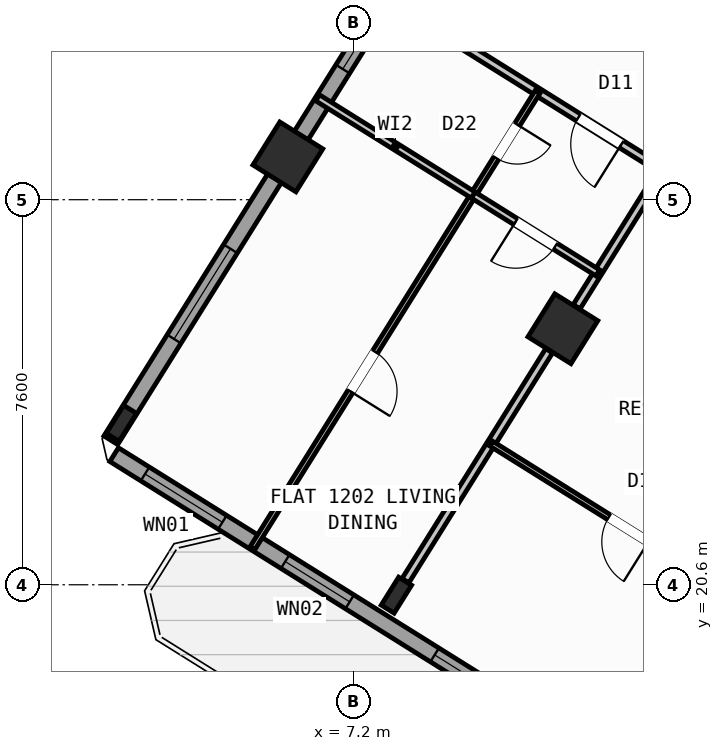
"""IFC4 building model, lengths in metres.
Left out: names, types, materials, properties, quantities, classifications, styles, units other than length and angle.
Written with IfcOpenShell. Run it as: python <this file> out.ifc"""

import sys

from ifc_helpers import new_model, si_unit, direction, frame, frame_2d, origin, origin_2d, place, context, subcontext, project, spatial, rectangle, hollow_rectangle, i_section, extrude, source, transform, mapped, element, fill, save


model = new_model("IFC4")
c1 = context("Model", 3, precision=1e-05, world=origin(), true_north=direction((0.0, 1.0)))
c2 = subcontext(c1, "Body", "Model", "MODEL_VIEW")
j1 = project(units=[si_unit("LENGTHUNIT", "METRE"), si_unit("PLANEANGLEUNIT", "RADIAN")], contexts=[c1])
p1 = place(None, origin())
s1 = spatial("IfcSite", under=j1, at=p1, CompositionType="ELEMENT")
p2 = place(p1, origin())
s2 = spatial("IfcBuilding", under=s1, at=p2, CompositionType="ELEMENT")
p3 = place(p2, frame((0.0, 0.0, 49.2)))
s3 = spatial("IfcBuildingStorey", under=s2, at=p3, CompositionType="ELEMENT", Elevation=49.2)
m1 = source(origin(), c2, "Body", "SweptSolid", [
    extrude(hollow_rectangle(XDim=1.0, YDim=1.0, WallThickness=0.04, at=origin_2d()), origin(), (0.0, 0.0, 1.0), 3.6),
])
p4 = place(p3, frame((11.336, 25.653, 0.0), z_axis=(0.0, 0.0, 1.0), x_axis=(-0.848048096156, 0.529919264233, 0.0)))
e1 = element("IfcColumn", 1, at=p4, inside=s3, PredefinedType="COLUMN", context=c2, shape_type="MappedRepresentation", body=[
    mapped(m1, transform((0.0, 0.0, 0.0), scale=1.0)),
])
m2 = source(origin(), c2, "Body", "SweptSolid", [
    extrude(i_section(OverallWidth=0.3, OverallDepth=0.65, WebThickness=0.016, FlangeThickness=0.031, at=origin_2d()), origin(), (0.0, 0.0, 1.0), 3.6),
])
p5 = place(p3, frame((8.051, 20.395, 0.0), z_axis=(0.0, 0.0, 1.0), x_axis=(-0.848048096156, 0.529919264233, 0.0)))
e2 = element("IfcColumn", 2, at=p5, inside=s3, PredefinedType="COLUMN", context=c2, shape_type="MappedRepresentation", body=[
    mapped(m2, transform((0.0, 0.0, 0.0), scale=1.0)),
])
p6 = place(p3, frame((5.909, 29.044, 0.0), z_axis=(0.0, 0.0, 1.0), x_axis=(-0.848048096156, 0.529919264233, 0.0)))
e3 = element("IfcColumn", 3, at=p6, inside=s3, PredefinedType="COLUMN", context=c2, shape_type="MappedRepresentation", body=[
    mapped(m1, transform((0.0, 0.0, 0.0), scale=1.0)),
])
p7 = place(p3, frame((2.623, 23.786, 0.0), z_axis=(0.0, 0.0, 1.0), x_axis=(-0.848048096156, 0.529919264233, 0.0)))
e4 = element("IfcColumn", 4, at=p7, inside=s3, PredefinedType="COLUMN", context=c2, shape_type="MappedRepresentation", body=[
    mapped(m2, transform((0.0, 0.0, 0.0), scale=1.0)),
])
p8 = place(p3, frame((29.268, 6.429, 0.0), z_axis=(0.0, 0.0, 1.0), x_axis=(-0.848049971435, 0.529916263149, 0.0)))
e5 = element("IfcWall", 5, at=p8, inside=s3, PredefinedType="STANDARD", context=c2, shape_type="SweptSolid", body=[
    extrude(rectangle(XDim=31.588, YDim=0.32, at=frame_2d((15.794, 0.0))), origin(), (0.0, 0.0, 1.0), 3.35),
])
p9 = place(p8, frame((16.362, 0.0, 0.0)))
e6 = element("IfcOpeningElement", 6, at=p9, cuts=e5, PredefinedType="OPENING", context=c2, shape_type="SweptSolid", body=[
    extrude(rectangle(XDim=1.2, YDim=2.15, at=frame_2d((0.6, 1.075))), frame((0.0, 0.17, 0.0), z_axis=(0.0, -1.0, 0.0), x_axis=(1.0, 0.0, 0.0)), (0.0, 0.0, 1.0), 0.34),
])
p10 = place(p8, frame((2.989, 0.0, 0.8)))
e7 = element("IfcOpeningElement", 7, at=p10, cuts=e5, PredefinedType="OPENING", context=c2, shape_type="SweptSolid", body=[
    extrude(rectangle(XDim=2.1, YDim=1.55, at=frame_2d((1.05, 0.775))), frame((0.0, 0.17, 0.0), z_axis=(0.0, -1.0, 0.0), x_axis=(1.0, 0.0, 0.0)), (0.0, 0.0, 1.0), 0.34),
])
p11 = place(p8, frame((8.359, 0.0, 0.8)))
e8 = element("IfcOpeningElement", 8, at=p11, cuts=e5, PredefinedType="OPENING", context=c2, shape_type="SweptSolid", body=[
    extrude(rectangle(XDim=2.1, YDim=1.55, at=frame_2d((1.05, 0.775))), frame((0.0, 0.17, 0.0), z_axis=(0.0, -1.0, 0.0), x_axis=(1.0, 0.0, 0.0)), (0.0, 0.0, 1.0), 0.34),
])
p12 = place(p8, frame((13.284, 0.0, 0.95)))
e9 = element("IfcOpeningElement", 9, at=p12, cuts=e5, PredefinedType="OPENING", context=c2, shape_type="SweptSolid", body=[
    extrude(rectangle(XDim=1.2, YDim=1.4, at=frame_2d((0.6, 0.7))), frame((0.0, 0.17, 0.0), z_axis=(0.0, -1.0, 0.0), x_axis=(1.0, 0.0, 0.0)), (0.0, 0.0, 1.0), 0.34),
])
p13 = place(p8, frame((20.259, 0.0, 0.95)))
e10 = element("IfcOpeningElement", 10, at=p13, cuts=e5, PredefinedType="OPENING", context=c2, shape_type="SweptSolid", body=[
    extrude(rectangle(XDim=1.2, YDim=1.4, at=frame_2d((0.6, 0.7))), frame((0.0, 0.17, 0.0), z_axis=(0.0, -1.0, 0.0), x_axis=(1.0, 0.0, 0.0)), (0.0, 0.0, 1.0), 0.34),
])
p14 = place(p8, frame((22.929, 0.0, 0.95)))
e11 = element("IfcOpeningElement", 11, at=p14, cuts=e5, PredefinedType="OPENING", context=c2, shape_type="SweptSolid", body=[
    extrude(rectangle(XDim=1.2, YDim=1.4, at=frame_2d((0.6, 0.7))), frame((0.0, 0.17, 0.0), z_axis=(0.0, -1.0, 0.0), x_axis=(1.0, 0.0, 0.0)), (0.0, 0.0, 1.0), 0.34),
])
p15 = place(p8, frame((26.106, 0.0, 0.85)))
e12 = element("IfcOpeningElement", 12, at=p15, cuts=e5, PredefinedType="OPENING", context=c2, shape_type="SweptSolid", body=[
    extrude(rectangle(XDim=1.5, YDim=1.5, at=frame_2d((0.75, 0.75))), frame((0.0, 0.17, 0.0), z_axis=(0.0, -1.0, 0.0), x_axis=(1.0, 0.0, 0.0)), (0.0, 0.0, 1.0), 0.34),
])
p16 = place(p8, frame((29.068, 0.0, 0.85)))
e13 = element("IfcOpeningElement", 13, at=p16, cuts=e5, PredefinedType="OPENING", context=c2, shape_type="SweptSolid", body=[
    extrude(rectangle(XDim=1.8, YDim=1.5, at=frame_2d((0.9, 0.75))), frame((0.0, 0.17, 0.0), z_axis=(0.0, -1.0, 0.0), x_axis=(1.0, 0.0, 0.0)), (0.0, 0.0, 1.0), 0.34),
])
p17 = place(p3, frame((2.415, 23.452, 0.0), z_axis=(0.0, 0.0, 1.0), x_axis=(0.52991049553, 0.848053575387, 0.0)))
e14 = element("IfcWall", 14, at=p17, inside=s3, PredefinedType="STANDARD", context=c2, shape_type="SweptSolid", body=[
    extrude(rectangle(XDim=21.587, YDim=0.32, at=frame_2d((10.794, 0.0))), origin(), (0.0, 0.0, 1.0), 2.725),
])
p18 = place(p17, frame((2.356, 0.0, 0.8)))
e15 = element("IfcOpeningElement", 15, at=p18, cuts=e14, PredefinedType="OPENING", context=c2, shape_type="SweptSolid", body=[
    extrude(rectangle(XDim=2.1, YDim=1.55, at=frame_2d((1.05, 0.775))), frame((0.0, 0.17, 0.0), z_axis=(0.0, -1.0, 0.0), x_axis=(1.0, 0.0, 0.0)), (0.0, 0.0, 1.0), 0.34),
])
p19 = place(p17, frame((8.639, 0.0, 1.0)))
e16 = element("IfcOpeningElement", 16, at=p19, cuts=e14, PredefinedType="OPENING", context=c2, shape_type="SweptSolid", body=[
    extrude(rectangle(XDim=0.9, YDim=1.25, at=frame_2d((0.45, 0.625))), frame((0.0, 0.17, 0.0), z_axis=(0.0, -1.0, 0.0), x_axis=(1.0, 0.0, 0.0)), (0.0, 0.0, 1.0), 0.34),
])
p20 = place(p17, frame((17.129, 0.0, 0.85)))
e17 = element("IfcOpeningElement", 17, at=p20, cuts=e14, PredefinedType="OPENING", context=c2, shape_type="SweptSolid", body=[
    extrude(rectangle(XDim=1.5, YDim=1.5, at=frame_2d((0.75, 0.75))), frame((0.0, 0.17, 0.0), z_axis=(0.0, -1.0, 0.0), x_axis=(1.0, 0.0, 0.0)), (0.0, 0.0, 1.0), 0.34),
])
p21 = place(p3, frame((23.104, 25.256, 0.0), z_axis=(0.0, 0.0, 1.0), x_axis=(-0.848041752158, 0.529929416617, 0.0)))
e18 = element("IfcWall", 18, at=p21, inside=s3, PredefinedType="PARTITIONING", context=c2, shape_type="SweptSolid", body=[
    extrude(rectangle(XDim=16.73, YDim=0.16, at=frame_2d((8.365, 0.0))), origin(), (0.0, 0.0, 1.0), 3.34),
])
p22 = place(p21, frame((1.395, 0.0, 0.0)))
e19 = element("IfcOpeningElement", 19, at=p22, cuts=e18, PredefinedType="OPENING", context=c2, shape_type="SweptSolid", body=[
    extrude(rectangle(XDim=1.0, YDim=2.1, at=frame_2d((0.5, 1.05))), frame((0.0, 0.09, 0.0), z_axis=(0.0, -1.0, 0.0), x_axis=(1.0, 0.0, 0.0)), (0.0, 0.0, 1.0), 0.18),
])
p23 = place(p21, frame((7.82, 0.0, 0.0)))
e20 = element("IfcOpeningElement", 20, at=p23, cuts=e18, PredefinedType="OPENING", context=c2, shape_type="SweptSolid", body=[
    extrude(rectangle(XDim=1.0, YDim=2.1, at=frame_2d((0.5, 1.05))), frame((0.0, 0.09, 0.0), z_axis=(0.0, -1.0, 0.0), x_axis=(1.0, 0.0, 0.0)), (0.0, 0.0, 1.0), 0.18),
])
p24 = place(p21, frame((14.76, 0.0, 0.0)))
e21 = element("IfcOpeningElement", 21, at=p24, cuts=e18, PredefinedType="OPENING", context=c2, shape_type="SweptSolid", body=[
    extrude(rectangle(XDim=1.0, YDim=2.1, at=frame_2d((0.5, 1.05))), frame((0.0, 0.09, 0.0), z_axis=(0.0, -1.0, 0.0), x_axis=(1.0, 0.0, 0.0)), (0.0, 0.0, 1.0), 0.18),
])
p25 = place(p3, frame((21.938, 23.391, 0.0), z_axis=(0.0, 0.0, 1.0), x_axis=(-0.848045850158, 0.529922858565, 0.0)))
e22 = element("IfcWall", 22, at=p25, inside=s3, PredefinedType="PARTITIONING", context=c2, shape_type="SweptSolid", body=[
    extrude(rectangle(XDim=16.73, YDim=0.16, at=frame_2d((8.365, 0.0))), origin(), (0.0, 0.0, 1.0), 3.34),
])
p26 = place(p25, frame((2.22, 0.0, 0.0)))
e23 = element("IfcOpeningElement", 23, at=p26, cuts=e22, PredefinedType="OPENING", context=c2, shape_type="SweptSolid", body=[
    extrude(rectangle(XDim=0.86, YDim=2.05, at=frame_2d((0.43, 1.025))), frame((0.0, 0.09, 0.0), z_axis=(0.0, -1.0, 0.0), x_axis=(1.0, 0.0, 0.0)), (0.0, 0.0, 1.0), 0.18),
])
p27 = place(p25, frame((6.49, 0.0, 0.0)))
e24 = element("IfcOpeningElement", 24, at=p27, cuts=e22, PredefinedType="OPENING", context=c2, shape_type="SweptSolid", body=[
    extrude(rectangle(XDim=1.0, YDim=2.1, at=frame_2d((0.5, 1.05))), frame((0.0, 0.09, 0.0), z_axis=(0.0, -1.0, 0.0), x_axis=(1.0, 0.0, 0.0)), (0.0, 0.0, 1.0), 0.18),
])
p28 = place(p25, frame((11.14, 0.0, 0.0)))
e25 = element("IfcOpeningElement", 25, at=p28, cuts=e22, PredefinedType="OPENING", context=c2, shape_type="SweptSolid", body=[
    extrude(rectangle(XDim=1.0, YDim=2.1, at=frame_2d((0.5, 1.05))), frame((0.0, 0.09, 0.0), z_axis=(0.0, -1.0, 0.0), x_axis=(1.0, 0.0, 0.0)), (0.0, 0.0, 1.0), 0.18),
])
p29 = place(p3, frame((13.297, 28.791, 0.0), z_axis=(0.0, 0.0, 1.0), x_axis=(-0.529930102756, -0.848041323399, 0.0)))
e26 = element("IfcWall", 26, at=p29, inside=s3, PredefinedType="PARTITIONING", context=c2, shape_type="SweptSolid", body=[
    extrude(rectangle(XDim=3.188, YDim=0.16, at=frame_2d((1.594, 0.0))), origin(), (0.0, 0.0, 1.0), 2.725),
])
p30 = place(p3, frame((11.065, 25.219, 0.0), z_axis=(0.0, 0.0, 1.0), x_axis=(-0.529904608059, -0.848057254175, 0.0)))
e27 = element("IfcWall", 27, at=p30, inside=s3, PredefinedType="PARTITIONING", context=c2, shape_type="SweptSolid", body=[
    extrude(rectangle(XDim=5.351, YDim=0.16, at=frame_2d((2.675, 0.0))), origin(), (0.0, 0.0, 1.0), 2.725),
])
p31 = place(p3, frame((15.348, 19.995, 0.0), z_axis=(0.0, 0.0, 1.0), x_axis=(-0.848056163074, 0.529906354247, 0.0)))
e28 = element("IfcWall", 28, at=p31, inside=s3, PredefinedType="PARTITIONING", context=c2, shape_type="SweptSolid", body=[
    extrude(rectangle(XDim=6.4, YDim=0.11, at=frame_2d((3.2, 0.0))), origin(), (0.0, 0.0, 1.0), 3.34),
])
p32 = place(p31, frame((2.74, 0.0, 0.0)))
e29 = element("IfcOpeningElement", 29, at=p32, cuts=e28, PredefinedType="OPENING", context=c2, shape_type="SweptSolid", body=[
    extrude(rectangle(XDim=0.92, YDim=2.08, at=frame_2d((0.46, 1.04))), frame((0.0, 0.065, 0.0), z_axis=(0.0, -1.0, 0.0), x_axis=(1.0, 0.0, 0.0)), (0.0, 0.0, 1.0), 0.13),
])
p33 = place(p3, frame((10.837, 30.327, 0.0), z_axis=(0.0, 0.0, 1.0), x_axis=(-0.529912148489, -0.848052542525, 0.0)))
e30 = element("IfcWall", 30, at=p33, inside=s3, PredefinedType="PARTITIONING", context=c2, shape_type="SweptSolid", body=[
    extrude(rectangle(XDim=10.62, YDim=0.11, at=frame_2d((5.31, 0.0))), origin(), (0.0, 0.0, 1.0), 3.34),
])
p34 = place(p33, frame((0.76, 0.0, 0.0)))
e31 = element("IfcOpeningElement", 31, at=p34, cuts=e30, PredefinedType="OPENING", context=c2, shape_type="SweptSolid", body=[
    extrude(rectangle(XDim=0.78, YDim=2.05, at=frame_2d((0.39, 1.025))), frame((0.0, 0.065, 0.0), z_axis=(0.0, -1.0, 0.0), x_axis=(1.0, 0.0, 0.0)), (0.0, 0.0, 1.0), 0.13),
])
p35 = place(p33, frame((6.05, 0.0, 0.0)))
e32 = element("IfcOpeningElement", 32, at=p35, cuts=e30, PredefinedType="OPENING", context=c2, shape_type="SweptSolid", body=[
    extrude(rectangle(XDim=0.92, YDim=2.08, at=frame_2d((0.46, 1.04))), frame((0.0, 0.065, 0.0), z_axis=(0.0, -1.0, 0.0), x_axis=(1.0, 0.0, 0.0)), (0.0, 0.0, 1.0), 0.13),
])
p36 = place(p3, frame((12.025, 26.755, 0.0), z_axis=(0.0, 0.0, 1.0), x_axis=(-0.848059786386, 0.529900555496, 0.0)))
e33 = element("IfcWall", 33, at=p36, inside=s3, PredefinedType="PLUMBINGWALL", context=c2, shape_type="SweptSolid", body=[
    extrude(rectangle(XDim=2.9, YDim=0.14, at=frame_2d((1.45, 0.0))), origin(), (0.0, 0.0, 1.0), 3.34),
])
p37 = place(p36, frame((0.99, 0.0, 0.0)))
e34 = element("IfcOpeningElement", 34, at=p37, cuts=e33, PredefinedType="OPENING", context=c2, shape_type="SweptSolid", body=[
    extrude(rectangle(XDim=0.92, YDim=2.08, at=frame_2d((0.46, 1.04))), frame((0.0, 0.08, 0.0), z_axis=(0.0, -1.0, 0.0), x_axis=(1.0, 0.0, 0.0)), (0.0, 0.0, 1.0), 0.16),
])
p38 = place(p3, frame((9.566, 28.292, 0.0), z_axis=(0.0, 0.0, 1.0), x_axis=(-0.848021036626, 0.529962566074, 0.0)))
e35 = element("IfcWall", 35, at=p38, inside=s3, PredefinedType="PLUMBINGWALL", context=c2, shape_type="SweptSolid", body=[
    extrude(rectangle(XDim=3.62, YDim=0.14, at=frame_2d((1.81, 0.0))), origin(), (0.0, 0.0, 1.0), 3.34),
])
m3 = source(origin(), c2, "Body", "SweptSolid", [
    extrude(rectangle(XDim=1.2, YDim=1.4, at=frame_2d((0.6, 0.7))), frame((0.0, 0.03, 0.0), z_axis=(0.0, -1.0, 0.0), x_axis=(1.0, 0.0, 0.0)), (0.0, 0.0, 1.0), 0.06),
])
p39 = place(p14, origin())
e36 = element("IfcWindow", 36, at=p39, inside=s3, PartitioningType="SINGLE_PANEL", PredefinedType="WINDOW", context=c2, shape_type="MappedRepresentation", body=[
    mapped(m3, transform((0.0, 0.0, 0.0), scale=1.0)),
])
fill(e11, e36)
m4 = source(origin(), c2, "Body", "SweptSolid", [
    extrude(rectangle(XDim=1.5, YDim=1.5, at=frame_2d((0.75, 0.75))), frame((0.0, 0.03, 0.0), z_axis=(0.0, -1.0, 0.0), x_axis=(1.0, 0.0, 0.0)), (0.0, 0.0, 1.0), 0.06),
])
p40 = place(p15, origin())
e37 = element("IfcWindow", 37, at=p40, inside=s3, PartitioningType="SINGLE_PANEL", PredefinedType="WINDOW", context=c2, shape_type="MappedRepresentation", body=[
    mapped(m4, transform((0.0, 0.0, 0.0), scale=1.0)),
])
fill(e12, e37)
m5 = source(origin(), c2, "Body", "SweptSolid", [
    extrude(rectangle(XDim=1.8, YDim=1.5, at=frame_2d((0.9, 0.75))), frame((0.0, 0.03, 0.0), z_axis=(0.0, -1.0, 0.0), x_axis=(1.0, 0.0, 0.0)), (0.0, 0.0, 1.0), 0.06),
])
p41 = place(p16, origin())
e38 = element("IfcWindow", 38, at=p41, inside=s3, PartitioningType="SINGLE_PANEL", PredefinedType="WINDOW", context=c2, shape_type="MappedRepresentation", body=[
    mapped(m5, transform((0.0, 0.0, 0.0), scale=1.0)),
])
fill(e13, e38)
m6 = source(origin(), c2, "Body", "SweptSolid", [
    extrude(rectangle(XDim=2.1, YDim=1.55, at=frame_2d((1.05, 0.775))), frame((0.0, 0.03, 0.0), z_axis=(0.0, -1.0, 0.0), x_axis=(1.0, 0.0, 0.0)), (0.0, 0.0, 1.0), 0.06),
])
p42 = place(p18, origin())
e39 = element("IfcWindow", 39, at=p42, inside=s3, PartitioningType="SINGLE_PANEL", PredefinedType="WINDOW", context=c2, shape_type="MappedRepresentation", body=[
    mapped(m6, transform((0.0, 0.0, 0.0), scale=1.0)),
])
fill(e15, e39)
m7 = source(origin(), c2, "Body", "SweptSolid", [
    extrude(rectangle(XDim=0.9, YDim=1.25, at=frame_2d((0.45, 0.625))), frame((0.0, 0.03, 0.0), z_axis=(0.0, -1.0, 0.0), x_axis=(1.0, 0.0, 0.0)), (0.0, 0.0, 1.0), 0.06),
])
p43 = place(p19, origin())
e40 = element("IfcWindow", 40, at=p43, inside=s3, PartitioningType="SINGLE_PANEL", PredefinedType="WINDOW", context=c2, shape_type="MappedRepresentation", body=[
    mapped(m7, transform((0.0, 0.0, 0.0), scale=1.0)),
])
fill(e16, e40)
m8 = source(origin(), c2, "Body", "SweptSolid", [
    extrude(rectangle(XDim=0.92, YDim=2.08, at=frame_2d((0.46, 1.04))), frame((0.0, 0.025, 0.0), z_axis=(0.0, -1.0, 0.0), x_axis=(1.0, 0.0, 0.0)), (0.0, 0.0, 1.0), 0.05),
])
p44 = place(p32, origin())
e41 = element("IfcDoor", 41, at=p44, inside=s3, OperationType="SINGLE_SWING_LEFT", PredefinedType="DOOR", context=c2, shape_type="MappedRepresentation", body=[
    mapped(m8, transform((0.0, 0.0, 0.0), scale=1.0)),
])
fill(e29, e41)
m9 = source(origin(), c2, "Body", "SweptSolid", [
    extrude(rectangle(XDim=1.0, YDim=2.1, at=frame_2d((0.5, 1.05))), frame((0.0, 0.025, 0.0), z_axis=(0.0, -1.0, 0.0), x_axis=(1.0, 0.0, 0.0)), (0.0, 0.0, 1.0), 0.05),
])
p45 = place(p28, origin())
e42 = element("IfcDoor", 42, at=p45, inside=s3, OperationType="SINGLE_SWING_LEFT", PredefinedType="DOOR", context=c2, shape_type="MappedRepresentation", body=[
    mapped(m9, transform((0.0, 0.0, 0.0), scale=1.0)),
])
fill(e25, e42)
p46 = place(p37, origin())
e43 = element("IfcDoor", 43, at=p46, inside=s3, OperationType="SINGLE_SWING_RIGHT", PredefinedType="DOOR", context=c2, shape_type="MappedRepresentation", body=[
    mapped(m8, transform((0.0, 0.0, 0.0), scale=1.0)),
])
fill(e34, e43)
m10 = source(origin(), c2, "Body", "SweptSolid", [
    extrude(rectangle(XDim=0.78, YDim=2.05, at=frame_2d((0.39, 1.025))), frame((0.0, 0.025, 0.0), z_axis=(0.0, -1.0, 0.0), x_axis=(1.0, 0.0, 0.0)), (0.0, 0.0, 1.0), 0.05),
])
p47 = place(p34, origin())
e44 = element("IfcDoor", 44, at=p47, inside=s3, OperationType="SINGLE_SWING_LEFT", PredefinedType="DOOR", context=c2, shape_type="MappedRepresentation", body=[
    mapped(m10, transform((0.0, 0.0, 0.0), scale=1.0)),
])
fill(e31, e44)
p48 = place(p35, origin())
e45 = element("IfcDoor", 45, at=p48, inside=s3, OperationType="SINGLE_SWING_RIGHT", PredefinedType="DOOR", context=c2, shape_type="MappedRepresentation", body=[
    mapped(m8, transform((0.0, 0.0, 0.0), scale=1.0)),
])
fill(e32, e45)
save(model, sys.argv[1])
